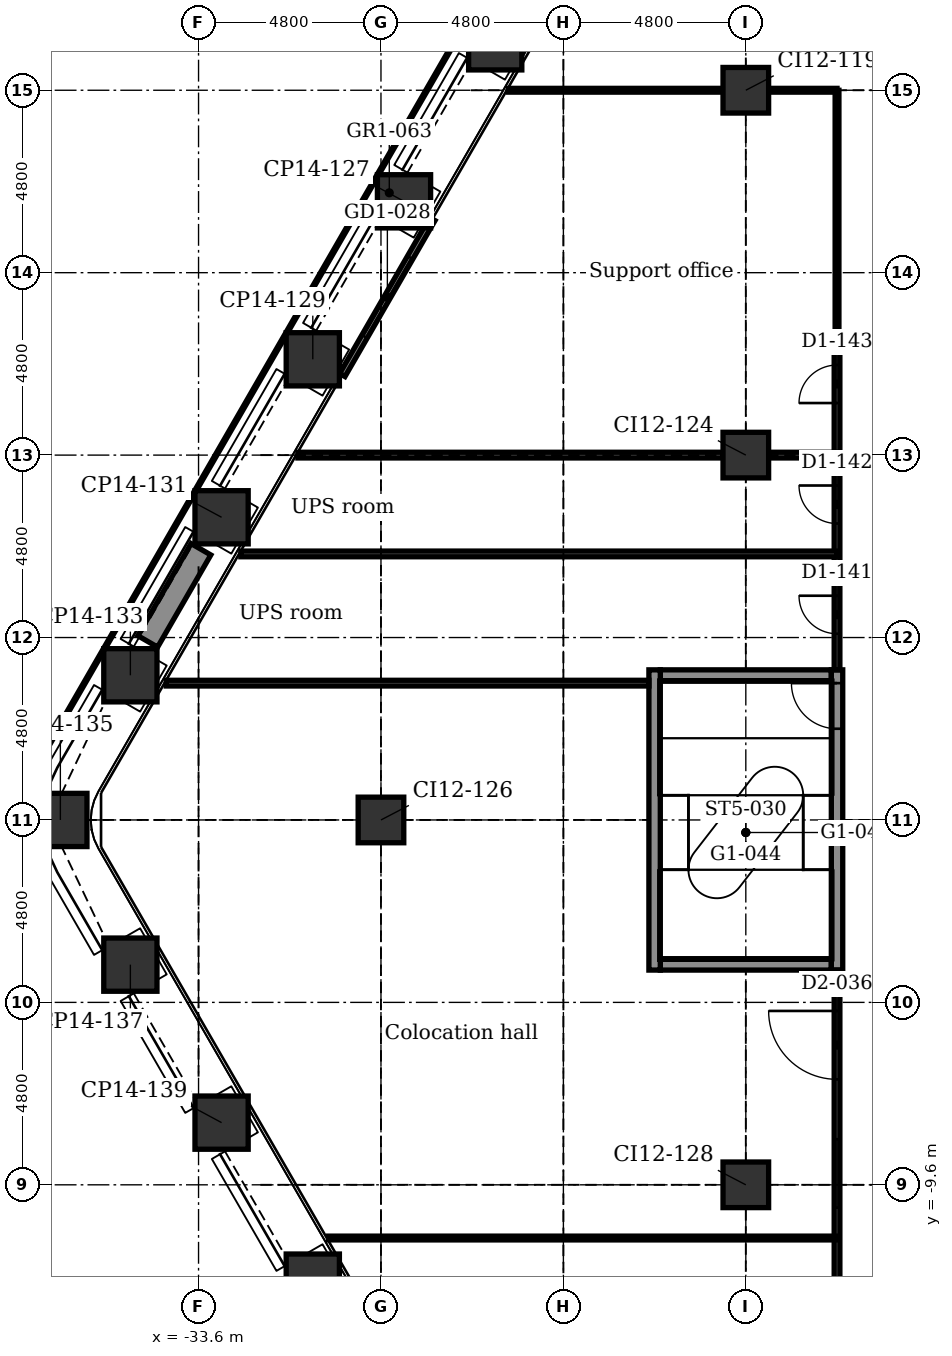
"""IFC4 building model, lengths in metres.
Left out: names, types, materials, properties, quantities, classifications, styles, units other than length and angle.
Written with IfcOpenShell. Run it as: python <this file> out.ifc"""

import sys

from ifc_helpers import new_model, si_unit, direction, frame, frame_2d, origin, origin_2d, place, context, subcontext, project, spatial, rectangle, extrude, element, fill, save


model = new_model("IFC4")
c1 = context("Model", 3, precision=1e-05, world=origin(), true_north=direction((0.0, 1.0)))
c2 = subcontext(c1, "Body", "Model", "MODEL_VIEW")
j1 = project(units=[si_unit("LENGTHUNIT", "METRE"), si_unit("PLANEANGLEUNIT", "RADIAN")], contexts=[c1])
p1 = place(None, origin())
s1 = spatial("IfcSite", under=j1, at=p1, CompositionType="ELEMENT")
p2 = place(p1, origin())
s2 = spatial("IfcBuilding", under=s1, at=p2, CompositionType="ELEMENT")
p3 = place(p2, frame((0.0, 0.0, 60.9)))
s3 = spatial("IfcBuildingStorey", under=s2, at=p3, CompositionType="ELEMENT", Elevation=60.9)
for number, where, z_axis, x_axis in (
    (1, (-30.594, -12.121, -0.25), (0.0, 0.0, 1.0), (0.866, 0.5, 0.0)),
    (2, (-32.994, -7.964, -0.25), (0.0, 0.0, 1.0), (0.866, 0.5, 0.0)),
    (3, (-35.394, -3.807, -0.25), (0.0, 0.0, 1.0), (0.866, 0.5, 0.0)),
    (4, (-37.236, 0.0, -0.25), (0.0, 0.0, 1.0), (1.0, 0.0, 0.0)),
    (5, (-35.394, 3.807, -0.25), (0.0, 0.0, 1.0), (0.5, 0.866, 0.0)),
    (6, (-32.994, 7.964, -0.25), (0.0, 0.0, 1.0), (0.5, 0.866, 0.0)),
    (7, (-30.594, 12.121, -0.25), (0.0, 0.0, 1.0), (0.5, 0.866, 0.0)),
    (8, (-28.194, 16.278, -0.25), (0.0, 0.0, 1.0), (0.5, 0.866, 0.0)),
    (9, (-25.794, 20.435, -0.25), (0.0, 0.0, 1.0), (0.5, 0.866, 0.0)),
):
    element("IfcColumn", number, at=place(p3, frame(where, z_axis=z_axis, x_axis=x_axis)), inside=s3, PredefinedType="COLUMN", context=c2, shape_type="SweptSolid", body=[
        extrude(rectangle(XDim=1.4, YDim=1.4, at=origin_2d()), origin(), (0.0, 0.0, 1.0), 5.45),
    ])
for number, where, z_axis, x_axis in (
    (10, (-28.8, 0.0, -0.25), (0.0, 0.0, 1.0), (1.0, 0.0, 0.0)),
    (11, (-19.2, -9.6, -0.25), (0.0, 0.0, 1.0), (1.0, 0.0, 0.0)),
    (12, (-19.2, 9.6, -0.25), (0.0, 0.0, 1.0), (1.0, 0.0, 0.0)),
    (13, (-19.2, 19.2, -0.25), (0.0, 0.0, 1.0), (1.0, 0.0, 0.0)),
):
    element("IfcColumn", number, at=place(p3, frame(where, z_axis=z_axis, x_axis=x_axis)), inside=s3, PredefinedType="COLUMN", context=c2, shape_type="SweptSolid", body=[
        extrude(rectangle(XDim=1.2, YDim=1.2, at=origin_2d()), origin(), (0.0, 0.0, 1.0), 5.45),
    ])
for number, where, z_axis, x_axis in (
    (14, (-21.45, -3.8, -0.25), (0.0, 0.0, 1.0), (1.0, 0.0, 0.0)),
    (15, (-21.45, 3.8, -0.25), (0.0, 0.0, 1.0), (1.0, 0.0, 0.0)),
):
    element("IfcWall", number, at=place(p3, frame(where, z_axis=z_axis, x_axis=x_axis)), inside=s3, PredefinedType="STANDARD", context=c2, shape_type="SweptSolid", body=[
        extrude(rectangle(XDim=4.5, YDim=0.3, at=frame_2d((2.25, 0.0))), origin(), (0.0, 0.0, 1.0), 5.45),
    ])
p4 = place(p3, frame((-21.6, -3.95, -0.25), z_axis=(0.0, 0.0, 1.0), x_axis=(0.0, 1.0, 0.0)))
e16 = element("IfcWall", 16, at=p4, inside=s3, PredefinedType="STANDARD", context=c2, shape_type="SweptSolid", body=[
    extrude(rectangle(XDim=7.9, YDim=0.3, at=frame_2d((3.95, 0.0))), origin(), (0.0, 0.0, 1.0), 5.45),
])
p5 = place(p3, frame((-16.8, -3.95, -0.25), z_axis=(0.0, 0.0, 1.0), x_axis=(0.0, 1.0, 0.0)))
e17 = element("IfcWall", 17, at=p5, inside=s3, PredefinedType="STANDARD", context=c2, shape_type="SweptSolid", body=[
    extrude(rectangle(XDim=7.9, YDim=0.3, at=frame_2d((3.95, 0.0))), origin(), (0.0, 0.0, 1.0), 5.45),
])
p6 = place(p5, frame((6.35, 0.0, 0.25)))
e18 = element("IfcOpeningElement", 18, at=p6, cuts=e17, PredefinedType="OPENING", context=c2, shape_type="SweptSolid", body=[
    extrude(rectangle(XDim=1.2, YDim=2.1, at=frame_2d((0.6, 1.05))), frame((0.0, 0.16, 0.0), z_axis=(0.0, -1.0, 0.0), x_axis=(1.0, 0.0, 0.0)), (0.0, 0.0, 1.0), 0.32),
])
p7 = place(p3, frame((-29.817, 11.707, 0.0), z_axis=(0.0, 0.0, 1.0), x_axis=(0.499978080042, 0.866038058908, 0.0)))
e19 = element("IfcWall", 19, at=p7, inside=s3, PredefinedType="PARTITIONING", context=c2, shape_type="SweptSolid", body=[
    extrude(rectangle(XDim=4.74, YDim=0.16, at=frame_2d((2.37, 0.0))), origin(), (0.0, 0.0, 1.0), 5.2),
])
p8 = place(p7, frame((1.17, 0.0, 0.0)))
e20 = element("IfcOpeningElement", 20, at=p8, cuts=e19, PredefinedType="OPENING", context=c2, shape_type="SweptSolid", body=[
    extrude(rectangle(XDim=2.4, YDim=2.4, at=frame_2d((1.2, 1.2))), frame((0.0, 0.09, 0.0), z_axis=(0.0, -1.0, 0.0), x_axis=(1.0, 0.0, 0.0)), (0.0, 0.0, 1.0), 0.18),
])
p9 = place(p3, frame((-34.937, 4.698, 0.0), z_axis=(0.0, 0.0, 1.0), x_axis=(0.49998411664, 0.866034573852, 0.0)))
e21 = element("IfcWall", 21, at=p9, inside=s3, PredefinedType="USERDEFINED", context=c2, shape_type="SweptSolid", body=[
    extrude(rectangle(XDim=2.8, YDim=0.6, at=frame_2d((1.4, 0.0))), origin(), (0.0, 0.0, 1.0), 0.7),
])
p10 = place(p3, frame((-16.8, 12.7, 0.0), z_axis=(0.0, 0.0, 1.0), x_axis=(0.0, 1.0, 0.0)))
e22 = element("IfcWall", 22, at=p10, inside=s3, PredefinedType="PARTITIONING", context=c2, shape_type="SweptSolid", body=[
    extrude(rectangle(XDim=6.5, YDim=0.1, at=frame_2d((3.25, 0.0))), origin(), (0.0, 0.0, 1.0), 5.2),
])
p11 = place(p3, frame((-16.8, -12.4, 0.0), z_axis=(0.0, 0.0, 1.0), x_axis=(0.0, 1.0, 0.0)))
e23 = element("IfcWall", 23, at=p11, inside=s3, PredefinedType="PARTITIONING", context=c2, shape_type="SweptSolid", body=[
    extrude(rectangle(XDim=8.45, YDim=0.15, at=frame_2d((4.225, 0.0))), origin(), (0.0, 0.0, 1.0), 5.2),
])
p12 = place(p11, frame((5.575, 0.0, 0.0)))
e24 = element("IfcOpeningElement", 24, at=p12, cuts=e23, PredefinedType="OPENING", context=c2, shape_type="SweptSolid", body=[
    extrude(rectangle(XDim=1.8, YDim=2.1, at=frame_2d((0.9, 1.05))), frame((0.0, 0.085, 0.0), z_axis=(0.0, -1.0, 0.0), x_axis=(1.0, 0.0, 0.0)), (0.0, 0.0, 1.0), 0.17),
])
p13 = place(p11, frame((2.2, 0.0, 0.9)))
e25 = element("IfcOpeningElement", 25, at=p13, cuts=e23, PredefinedType="OPENING", context=c2, shape_type="SweptSolid", body=[
    extrude(rectangle(XDim=1.8, YDim=1.5, at=frame_2d((0.9, 0.75))), frame((0.0, 0.085, 0.0), z_axis=(0.0, -1.0, 0.0), x_axis=(1.0, 0.0, 0.0)), (0.0, 0.0, 1.0), 0.17),
])
p14 = place(p3, frame((-16.8, 3.95, 0.0), z_axis=(0.0, 0.0, 1.0), x_axis=(0.0, 1.0, 0.0)))
e26 = element("IfcWall", 26, at=p14, inside=s3, PredefinedType="PARTITIONING", context=c2, shape_type="SweptSolid", body=[
    extrude(rectangle(XDim=8.75, YDim=0.15, at=frame_2d((4.375, 0.0))), origin(), (0.0, 0.0, 1.0), 5.2),
])
p15 = place(p14, frame((0.95, 0.0, 0.0)))
e27 = element("IfcOpeningElement", 27, at=p15, cuts=e26, PredefinedType="OPENING", context=c2, shape_type="SweptSolid", body=[
    extrude(rectangle(XDim=1.0, YDim=2.1, at=frame_2d((0.5, 1.05))), frame((0.0, 0.085, 0.0), z_axis=(0.0, -1.0, 0.0), x_axis=(1.0, 0.0, 0.0)), (0.0, 0.0, 1.0), 0.17),
])
p16 = place(p14, frame((3.85, 0.0, 0.0)))
e28 = element("IfcOpeningElement", 28, at=p16, cuts=e26, PredefinedType="OPENING", context=c2, shape_type="SweptSolid", body=[
    extrude(rectangle(XDim=1.0, YDim=2.1, at=frame_2d((0.5, 1.05))), frame((0.0, 0.085, 0.0), z_axis=(0.0, -1.0, 0.0), x_axis=(1.0, 0.0, 0.0)), (0.0, 0.0, 1.0), 0.17),
])
p17 = place(p14, frame((7.02, 0.0, 0.0)))
e29 = element("IfcOpeningElement", 29, at=p17, cuts=e26, PredefinedType="OPENING", context=c2, shape_type="SweptSolid", body=[
    extrude(rectangle(XDim=1.0, YDim=2.1, at=frame_2d((0.5, 1.05))), frame((0.0, 0.085, 0.0), z_axis=(0.0, -1.0, 0.0), x_axis=(1.0, 0.0, 0.0)), (0.0, 0.0, 1.0), 0.17),
])
p18 = place(p3, frame((-30.178, -11.0, 0.0), z_axis=(0.0, 0.0, 1.0), x_axis=(1.0, 0.0, 0.0)))
e30 = element("IfcWall", 30, at=p18, inside=s3, PredefinedType="PARTITIONING", context=c2, shape_type="SweptSolid", body=[
    extrude(rectangle(XDim=13.378, YDim=0.1, at=frame_2d((6.689, 0.0))), origin(), (0.0, 0.0, 1.0), 5.2),
])
p19 = place(p3, frame((-34.451, 3.6, 0.0), z_axis=(0.0, 0.0, 1.0), x_axis=(1.0, 0.0, 0.0)))
e31 = element("IfcWall", 31, at=p19, inside=s3, PredefinedType="PARTITIONING", context=c2, shape_type="SweptSolid", body=[
    extrude(rectangle(XDim=12.701, YDim=0.15, at=frame_2d((6.351, 0.0))), origin(), (0.0, 0.0, 1.0), 5.2),
])
p20 = place(p3, frame((-32.488, 7.0, 0.0), z_axis=(0.0, 0.0, 1.0), x_axis=(1.0, 0.0, 0.0)))
e32 = element("IfcWall", 32, at=p20, inside=s3, PredefinedType="PARTITIONING", context=c2, shape_type="SweptSolid", body=[
    extrude(rectangle(XDim=15.688, YDim=0.15, at=frame_2d((7.844, 0.0))), origin(), (0.0, 0.0, 1.0), 5.2),
])
p21 = place(p3, frame((-30.987, 9.6, 0.0), z_axis=(0.0, 0.0, 1.0), x_axis=(1.0, 0.0, 0.0)))
e33 = element("IfcWall", 33, at=p21, inside=s3, PredefinedType="PARTITIONING", context=c2, shape_type="SweptSolid", body=[
    extrude(rectangle(XDim=11.187, YDim=0.15, at=frame_2d((5.593, 0.0))), origin(), (0.0, 0.0, 1.0), 4.36),
])
p22 = place(p3, frame((-18.6, 9.6, 0.0), z_axis=(0.0, 0.0, 1.0), x_axis=(1.0, 0.0, 0.0)))
e34 = element("IfcWall", 34, at=p22, inside=s3, PredefinedType="PARTITIONING", context=c2, shape_type="SweptSolid", body=[
    extrude(rectangle(XDim=1.8, YDim=0.15, at=frame_2d((0.9, 0.0))), origin(), (0.0, 0.0, 1.0), 4.592),
])
p23 = place(p3, frame((-16.8, 12.7, 0.0), z_axis=(0.0, 0.0, 1.0), x_axis=(1.0, 0.0, 0.0)))
e35 = element("IfcWall", 35, at=p23, inside=s3, PredefinedType="PARTITIONING", context=c2, shape_type="SweptSolid", body=[
    extrude(rectangle(XDim=33.6, YDim=0.15, at=frame_2d((16.8, 0.0))), origin(), (0.0, 0.0, 1.0), 5.2),
])
p24 = place(p23, frame((1.575, 0.0, 0.0)))
e36 = element("IfcOpeningElement", 36, at=p24, cuts=e35, PredefinedType="OPENING", context=c2, shape_type="SweptSolid", body=[
    extrude(rectangle(XDim=1.8, YDim=2.1, at=frame_2d((0.9, 1.05))), frame((0.0, 0.085, 0.0), z_axis=(0.0, -1.0, 0.0), x_axis=(1.0, 0.0, 0.0)), (0.0, 0.0, 1.0), 0.17),
])
p25 = place(p23, frame((9.1, 0.0, 0.0)))
e37 = element("IfcOpeningElement", 37, at=p25, cuts=e35, PredefinedType="OPENING", context=c2, shape_type="SweptSolid", body=[
    extrude(rectangle(XDim=1.0, YDim=2.1, at=frame_2d((0.5, 1.05))), frame((0.0, 0.085, 0.0), z_axis=(0.0, -1.0, 0.0), x_axis=(1.0, 0.0, 0.0)), (0.0, 0.0, 1.0), 0.17),
])
p26 = place(p23, frame((14.915, 0.0, 0.0)))
e38 = element("IfcOpeningElement", 38, at=p26, cuts=e35, PredefinedType="OPENING", context=c2, shape_type="SweptSolid", body=[
    extrude(rectangle(XDim=1.0, YDim=2.1, at=frame_2d((0.5, 1.05))), frame((0.0, 0.085, 0.0), z_axis=(0.0, -1.0, 0.0), x_axis=(1.0, 0.0, 0.0)), (0.0, 0.0, 1.0), 0.17),
])
p27 = place(p23, frame((17.325, 0.0, 0.0)))
e39 = element("IfcOpeningElement", 39, at=p27, cuts=e35, PredefinedType="OPENING", context=c2, shape_type="SweptSolid", body=[
    extrude(rectangle(XDim=1.8, YDim=2.1, at=frame_2d((0.9, 1.05))), frame((0.0, 0.085, 0.0), z_axis=(0.0, -1.0, 0.0), x_axis=(1.0, 0.0, 0.0)), (0.0, 0.0, 1.0), 0.17),
])
p28 = place(p23, frame((29.775, 0.0, 0.0)))
e40 = element("IfcOpeningElement", 40, at=p28, cuts=e35, PredefinedType="OPENING", context=c2, shape_type="SweptSolid", body=[
    extrude(rectangle(XDim=1.8, YDim=2.1, at=frame_2d((0.9, 1.05))), frame((0.0, 0.085, 0.0), z_axis=(0.0, -1.0, 0.0), x_axis=(1.0, 0.0, 0.0)), (0.0, 0.0, 1.0), 0.17),
])
p29 = place(p23, frame((23.55, 0.0, 0.0)))
e41 = element("IfcOpeningElement", 41, at=p29, cuts=e35, PredefinedType="OPENING", context=c2, shape_type="SweptSolid", body=[
    extrude(rectangle(XDim=0.9, YDim=2.1, at=frame_2d((0.45, 1.05))), frame((0.0, 0.085, 0.0), z_axis=(0.0, -1.0, 0.0), x_axis=(1.0, 0.0, 0.0)), (0.0, 0.0, 1.0), 0.17),
])
p30 = place(p23, frame((20.55, 0.0, 0.0)))
e42 = element("IfcOpeningElement", 42, at=p30, cuts=e35, PredefinedType="OPENING", context=c2, shape_type="SweptSolid", body=[
    extrude(rectangle(XDim=0.9, YDim=2.1, at=frame_2d((0.45, 1.05))), frame((0.0, 0.085, 0.0), z_axis=(0.0, -1.0, 0.0), x_axis=(1.0, 0.0, 0.0)), (0.0, 0.0, 1.0), 0.17),
])
p31 = place(p23, frame((4.6, 0.0, 0.9)))
e43 = element("IfcOpeningElement", 43, at=p31, cuts=e35, PredefinedType="OPENING", context=c2, shape_type="SweptSolid", body=[
    extrude(rectangle(XDim=1.8, YDim=1.5, at=frame_2d((0.9, 0.75))), frame((0.0, 0.085, 0.0), z_axis=(0.0, -1.0, 0.0), x_axis=(1.0, 0.0, 0.0)), (0.0, 0.0, 1.0), 0.17),
])
p32 = place(p3, frame((-25.444, 19.2, 0.0), z_axis=(0.0, 0.0, 1.0), x_axis=(1.0, 0.0, 0.0)))
e44 = element("IfcWall", 44, at=p32, inside=s3, PredefinedType="PARTITIONING", context=c2, shape_type="SweptSolid", body=[
    extrude(rectangle(XDim=5.644, YDim=0.1, at=frame_2d((2.822, 0.0))), origin(), (0.0, 0.0, 1.0), 4.592),
])
p33 = place(p3, frame((-18.6, 19.2, 0.0), z_axis=(0.0, 0.0, 1.0), x_axis=(1.0, 0.0, 0.0)))
e45 = element("IfcWall", 45, at=p33, inside=s3, PredefinedType="PARTITIONING", context=c2, shape_type="SweptSolid", body=[
    extrude(rectangle(XDim=1.8, YDim=0.1, at=frame_2d((0.9, 0.0))), origin(), (0.0, 0.0, 1.0), 4.438),
])
p34 = place(p8, origin())
e46 = element("IfcDoor", 46, at=p34, inside=s3, OperationType="DOUBLE_DOOR_SLIDING", PredefinedType="DOOR", context=c2, shape_type="SweptSolid", body=[
    extrude(rectangle(XDim=2.4, YDim=2.4, at=frame_2d((1.2, 1.2))), frame((0.0, 0.025, 0.0), z_axis=(0.0, -1.0, 0.0), x_axis=(1.0, 0.0, 0.0)), (0.0, 0.0, 1.0), 0.05),
])
fill(e20, e46)
p35 = place(p12, origin())
e47 = element("IfcDoor", 47, at=p35, inside=s3, OperationType="SINGLE_SWING_RIGHT", PredefinedType="DOOR", context=c2, shape_type="SweptSolid", body=[
    extrude(rectangle(XDim=1.8, YDim=2.1, at=frame_2d((0.9, 1.05))), frame((0.0, 0.025, 0.0), z_axis=(0.0, -1.0, 0.0), x_axis=(1.0, 0.0, 0.0)), (0.0, 0.0, 1.0), 0.05),
])
fill(e24, e47)
p36 = place(p15, origin())
e48 = element("IfcDoor", 48, at=p36, inside=s3, OperationType="SINGLE_SWING_RIGHT", PredefinedType="DOOR", context=c2, shape_type="SweptSolid", body=[
    extrude(rectangle(XDim=1.0, YDim=2.1, at=frame_2d((0.5, 1.05))), frame((0.0, 0.025, 0.0), z_axis=(0.0, -1.0, 0.0), x_axis=(1.0, 0.0, 0.0)), (0.0, 0.0, 1.0), 0.05),
])
fill(e27, e48)
p37 = place(p16, origin())
e49 = element("IfcDoor", 49, at=p37, inside=s3, OperationType="SINGLE_SWING_RIGHT", PredefinedType="DOOR", context=c2, shape_type="SweptSolid", body=[
    extrude(rectangle(XDim=1.0, YDim=2.1, at=frame_2d((0.5, 1.05))), frame((0.0, 0.025, 0.0), z_axis=(0.0, -1.0, 0.0), x_axis=(1.0, 0.0, 0.0)), (0.0, 0.0, 1.0), 0.05),
])
fill(e28, e49)
p38 = place(p17, origin())
e50 = element("IfcDoor", 50, at=p38, inside=s3, OperationType="SINGLE_SWING_LEFT", PredefinedType="DOOR", context=c2, shape_type="SweptSolid", body=[
    extrude(rectangle(XDim=1.0, YDim=2.1, at=frame_2d((0.5, 1.05))), frame((0.0, 0.025, 0.0), z_axis=(0.0, -1.0, 0.0), x_axis=(1.0, 0.0, 0.0)), (0.0, 0.0, 1.0), 0.05),
])
fill(e29, e50)
p39 = place(p6, origin())
e51 = element("IfcDoor", 51, at=p39, inside=s3, OperationType="SINGLE_SWING_RIGHT", PredefinedType="DOOR", context=c2, shape_type="SweptSolid", body=[
    extrude(rectangle(XDim=1.2, YDim=2.1, at=frame_2d((0.6, 1.05))), frame((0.0, 0.025, 0.0), z_axis=(0.0, -1.0, 0.0), x_axis=(1.0, 0.0, 0.0)), (0.0, 0.0, 1.0), 0.05),
])
fill(e18, e51)
p40 = place(p13, origin())
e52 = element("IfcWindow", 52, at=p40, inside=s3, PartitioningType="SINGLE_PANEL", PredefinedType="WINDOW", context=c2, shape_type="SweptSolid", body=[
    extrude(rectangle(XDim=1.8, YDim=1.5, at=frame_2d((0.9, 0.75))), frame((0.0, 0.03, 0.0), z_axis=(0.0, -1.0, 0.0), x_axis=(1.0, 0.0, 0.0)), (0.0, 0.0, 1.0), 0.06),
])
fill(e25, e52)
save(model, sys.argv[1])
